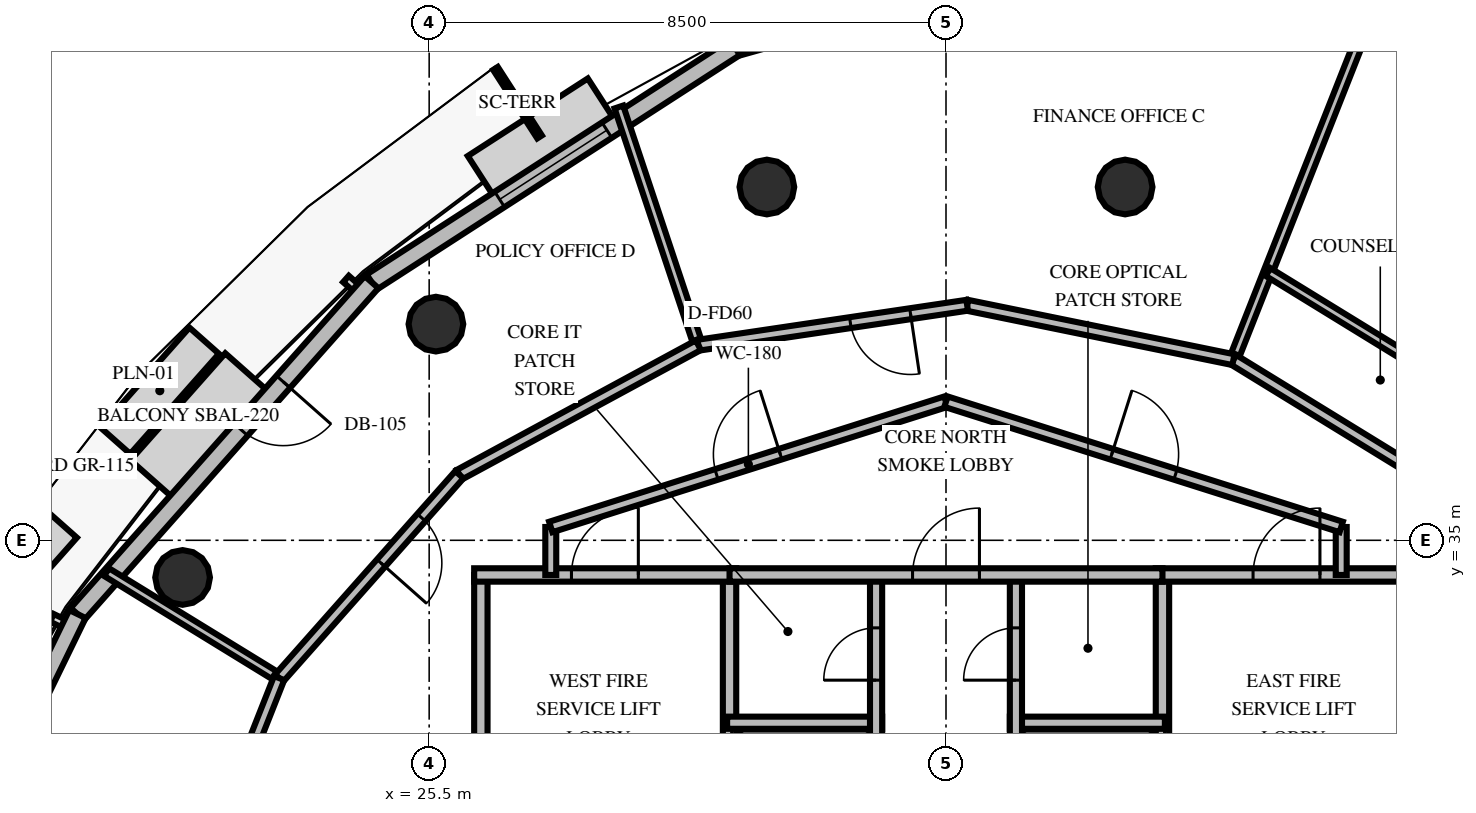
"""IFC4 building model, lengths in metres.
Left out: names, types, materials, properties, quantities, classifications, styles, units other than length and angle.
Written with IfcOpenShell. Run it as: python <this file> out.ifc"""

import sys

from ifc_helpers import new_model, si_unit, direction, frame, frame_2d, origin, origin_2d, place, context, subcontext, project, spatial, rectangle, circle, extrude, element, fill, save


model = new_model("IFC4")
c1 = context("Model", 3, precision=1e-05, world=origin(), true_north=direction((0.0, 1.0)))
c2 = subcontext(c1, "Body", "Model", "MODEL_VIEW")
j1 = project(units=[si_unit("LENGTHUNIT", "METRE"), si_unit("PLANEANGLEUNIT", "RADIAN")], contexts=[c1])
p1 = place(None, origin())
s1 = spatial("IfcSite", under=j1, at=p1, CompositionType="ELEMENT")
p2 = place(p1, origin())
s2 = spatial("IfcBuilding", under=s1, at=p2, CompositionType="ELEMENT")
p3 = place(p2, frame((0.0, 0.0, 234.0)))
s3 = spatial("IfcBuildingStorey", under=s2, at=p3, CompositionType="ELEMENT", Elevation=234.0)
for number, where, z_axis, x_axis in (
    (1, (36.946, 40.81, 0.0), (0.0, 0.0, 1.0), (1.0, 0.0, 0.0)),
    (2, (31.054, 40.81, 0.0), (0.0, 0.0, 1.0), (1.0, 0.0, 0.0)),
    (3, (25.611, 38.555, 0.0), (0.0, 0.0, 1.0), (1.0, 0.0, 0.0)),
    (4, (21.445, 34.389, 0.0), (0.0, 0.0, 1.0), (1.0, 0.0, 0.0)),
):
    element("IfcColumn", number, at=place(p3, frame(where, z_axis=z_axis, x_axis=x_axis)), inside=s3, PredefinedType="COLUMN", context=c2, shape_type="SweptSolid", body=[
        extrude(circle(Radius=0.45, at=origin_2d()), origin(), (0.0, 0.0, 1.0), 3.6),
    ])
p4 = place(p3, frame((36.925, 44.903, 0.0), z_axis=(0.0, 0.0, 1.0), x_axis=(-0.962704799022, -0.270554005589, 0.0)))
e5 = element("IfcWall", 5, at=p4, inside=s3, PredefinedType="SOLIDWALL", context=c2, shape_type="SweptSolid", body=[
    extrude(rectangle(XDim=6.643, YDim=0.3, at=frame_2d((3.322, 0.0))), origin(), (0.0, 0.0, 1.0), 2.76),
])
p5 = place(p4, frame((2.272, 0.0, 0.8)))
e6 = element("IfcOpeningElement", 6, at=p5, cuts=e5, PredefinedType="OPENING", context=c2, shape_type="SweptSolid", body=[
    extrude(rectangle(XDim=2.1, YDim=1.85, at=frame_2d((1.05, 0.925))), frame((0.0, 0.16, 0.0), z_axis=(0.0, -1.0, 0.0), x_axis=(1.0, 0.0, 0.0)), (0.0, 0.0, 1.0), 0.32),
])
p6 = place(p3, frame((30.53, 43.106, 0.0), z_axis=(0.0, 0.0, 1.0), x_axis=(-0.840018200764, -0.542558220272, 0.0)))
e7 = element("IfcWall", 7, at=p6, inside=s3, PredefinedType="SOLIDWALL", context=c2, shape_type="SweptSolid", body=[
    extrude(rectangle(XDim=7.115, YDim=0.3, at=frame_2d((3.558, 0.0))), origin(), (0.0, 0.0, 1.0), 2.76),
])
p7 = place(p6, frame((2.508, 0.0, 0.8)))
e8 = element("IfcOpeningElement", 8, at=p7, cuts=e7, PredefinedType="OPENING", context=c2, shape_type="SweptSolid", body=[
    extrude(rectangle(XDim=2.1, YDim=1.85, at=frame_2d((1.05, 0.925))), frame((0.0, 0.16, 0.0), z_axis=(0.0, -1.0, 0.0), x_axis=(1.0, 0.0, 0.0)), (0.0, 0.0, 1.0), 0.32),
])
p8 = place(p3, frame((24.553, 39.246, 0.0), z_axis=(0.0, 0.0, 1.0), x_axis=(-0.663261925143, -0.748387345333, 0.0)))
e9 = element("IfcWall", 9, at=p8, inside=s3, PredefinedType="SOLIDWALL", context=c2, shape_type="SweptSolid", body=[
    extrude(rectangle(XDim=7.293, YDim=0.3, at=frame_2d((3.647, 0.0))), origin(), (0.0, 0.0, 1.0), 2.76),
])
p9 = place(p8, frame((2.19, 0.0, 0.0)))
e10 = element("IfcOpeningElement", 10, at=p9, cuts=e9, PredefinedType="OPENING", context=c2, shape_type="SweptSolid", body=[
    extrude(rectangle(XDim=1.05, YDim=2.15, at=frame_2d((0.525, 1.075))), frame((0.0, 0.16, 0.0), z_axis=(0.0, -1.0, 0.0), x_axis=(1.0, 0.0, 0.0)), (0.0, 0.0, 1.0), 0.32),
])
p10 = place(p3, frame((19.716, 33.787, 0.0), z_axis=(0.0, 0.0, 1.0), x_axis=(-0.437731914834, -0.899105539264, 0.0)))
e11 = element("IfcWall", 11, at=p10, inside=s3, PredefinedType="SOLIDWALL", context=c2, shape_type="SweptSolid", body=[
    extrude(rectangle(XDim=7.115, YDim=0.3, at=frame_2d((3.558, 0.0))), origin(), (0.0, 0.0, 1.0), 2.76),
])
p11 = place(p10, frame((2.508, 0.0, 0.8)))
e12 = element("IfcOpeningElement", 12, at=p11, cuts=e11, PredefinedType="OPENING", context=c2, shape_type="SweptSolid", body=[
    extrude(rectangle(XDim=2.1, YDim=1.85, at=frame_2d((1.05, 0.925))), frame((0.0, 0.16, 0.0), z_axis=(0.0, -1.0, 0.0), x_axis=(1.0, 0.0, 0.0)), (0.0, 0.0, 1.0), 0.32),
])
p12 = place(p3, frame((26.35, 30.05, 0.0), z_axis=(0.0, 0.0, 1.0), x_axis=(0.0, 1.0, 0.0)))
e13 = element("IfcWall", 13, at=p12, inside=s3, PredefinedType="SOLIDWALL", context=c2, shape_type="SweptSolid", body=[
    extrude(rectangle(XDim=4.38, YDim=0.22, at=frame_2d((2.19, 0.0))), origin(), (0.0, 0.0, 1.0), 2.46),
])
p13 = place(p3, frame((30.44, 30.05, 0.0), z_axis=(0.0, 0.0, 1.0), x_axis=(0.0, 1.0, 0.0)))
e14 = element("IfcWall", 14, at=p13, inside=s3, PredefinedType="SOLIDWALL", context=c2, shape_type="SweptSolid", body=[
    extrude(rectangle(XDim=4.38, YDim=0.22, at=frame_2d((2.19, 0.0))), origin(), (0.0, 0.0, 1.0), 2.46),
])
p14 = place(p13, frame((0.8, 0.0, 0.0)))
e15 = element("IfcOpeningElement", 15, at=p14, cuts=e14, PredefinedType="OPENING", context=c2, shape_type="SweptSolid", body=[
    extrude(rectangle(XDim=1.05, YDim=2.1, at=frame_2d((0.525, 1.05))), frame((0.0, 0.12, 0.0), z_axis=(0.0, -1.0, 0.0), x_axis=(1.0, 0.0, 0.0)), (0.0, 0.0, 1.0), 0.24),
])
p15 = place(p3, frame((26.24, 34.43, 0.0), z_axis=(0.0, 0.0, 1.0), x_axis=(1.0, 0.0, 0.0)))
e16 = element("IfcWall", 16, at=p15, inside=s3, PredefinedType="SOLIDWALL", context=c2, shape_type="SweptSolid", body=[
    extrude(rectangle(XDim=4.31, YDim=0.22, at=frame_2d((2.155, 0.0))), origin(), (0.0, 0.0, 1.0), 2.46),
])
p16 = place(p15, frame((1.6, 0.0, 0.0)))
e17 = element("IfcOpeningElement", 17, at=p16, cuts=e16, PredefinedType="OPENING", context=c2, shape_type="SweptSolid", body=[
    extrude(rectangle(XDim=1.1, YDim=2.15, at=frame_2d((0.55, 1.075))), frame((0.0, 0.12, 0.0), z_axis=(0.0, -1.0, 0.0), x_axis=(1.0, 0.0, 0.0)), (0.0, 0.0, 1.0), 0.24),
])
p17 = place(p3, frame((30.4, 32.0, 0.0), z_axis=(0.0, 0.0, 1.0), x_axis=(1.0, 0.0, 0.0)))
e18 = element("IfcWall", 18, at=p17, inside=s3, PredefinedType="SOLIDWALL", context=c2, shape_type="SweptSolid", body=[
    extrude(rectangle(XDim=2.55, YDim=0.2, at=frame_2d((1.275, 0.0))), origin(), (0.0, 0.0, 1.0), 2.46),
])
p18 = place(p3, frame((32.85, 30.05, 0.0), z_axis=(0.0, 0.0, 1.0), x_axis=(0.0, 1.0, 0.0)))
e19 = element("IfcWall", 19, at=p18, inside=s3, PredefinedType="SOLIDWALL", context=c2, shape_type="SweptSolid", body=[
    extrude(rectangle(XDim=4.38, YDim=0.2, at=frame_2d((2.19, 0.0))), origin(), (0.0, 0.0, 1.0), 2.46),
])
p19 = place(p18, frame((2.65, 0.0, 0.0)))
e20 = element("IfcOpeningElement", 20, at=p19, cuts=e19, PredefinedType="OPENING", context=c2, shape_type="SweptSolid", body=[
    extrude(rectangle(XDim=0.86, YDim=2.05, at=frame_2d((0.43, 1.025))), frame((0.0, 0.11, 0.0), z_axis=(0.0, -1.0, 0.0), x_axis=(1.0, 0.0, 0.0)), (0.0, 0.0, 1.0), 0.22),
])
p20 = place(p3, frame((37.56, 30.05, 0.0), z_axis=(0.0, 0.0, 1.0), x_axis=(0.0, 1.0, 0.0)))
e21 = element("IfcWall", 21, at=p20, inside=s3, PredefinedType="SOLIDWALL", context=c2, shape_type="SweptSolid", body=[
    extrude(rectangle(XDim=4.38, YDim=0.22, at=frame_2d((2.19, 0.0))), origin(), (0.0, 0.0, 1.0), 2.46),
])
p21 = place(p20, frame((0.8, 0.0, 0.0)))
e22 = element("IfcOpeningElement", 22, at=p21, cuts=e21, PredefinedType="OPENING", context=c2, shape_type="SweptSolid", body=[
    extrude(rectangle(XDim=1.05, YDim=2.1, at=frame_2d((0.525, 1.05))), frame((0.0, 0.12, 0.0), z_axis=(0.0, -1.0, 0.0), x_axis=(1.0, 0.0, 0.0)), (0.0, 0.0, 1.0), 0.24),
])
p22 = place(p3, frame((37.45, 34.43, 0.0), z_axis=(0.0, 0.0, 1.0), x_axis=(1.0, 0.0, 0.0)))
e23 = element("IfcWall", 23, at=p22, inside=s3, PredefinedType="SOLIDWALL", context=c2, shape_type="SweptSolid", body=[
    extrude(rectangle(XDim=4.31, YDim=0.22, at=frame_2d((2.155, 0.0))), origin(), (0.0, 0.0, 1.0), 2.46),
])
p23 = place(p22, frame((1.6, 0.0, 0.0)))
e24 = element("IfcOpeningElement", 24, at=p23, cuts=e23, PredefinedType="OPENING", context=c2, shape_type="SweptSolid", body=[
    extrude(rectangle(XDim=1.1, YDim=2.15, at=frame_2d((0.55, 1.075))), frame((0.0, 0.12, 0.0), z_axis=(0.0, -1.0, 0.0), x_axis=(1.0, 0.0, 0.0)), (0.0, 0.0, 1.0), 0.24),
])
p24 = place(p3, frame((35.05, 32.0, 0.0), z_axis=(0.0, 0.0, 1.0), x_axis=(1.0, 0.0, 0.0)))
e25 = element("IfcWall", 25, at=p24, inside=s3, PredefinedType="SOLIDWALL", context=c2, shape_type="SweptSolid", body=[
    extrude(rectangle(XDim=2.55, YDim=0.2, at=frame_2d((1.275, 0.0))), origin(), (0.0, 0.0, 1.0), 2.46),
])
p25 = place(p3, frame((35.15, 30.05, 0.0), z_axis=(0.0, 0.0, 1.0), x_axis=(0.0, 1.0, 0.0)))
e26 = element("IfcWall", 26, at=p25, inside=s3, PredefinedType="SOLIDWALL", context=c2, shape_type="SweptSolid", body=[
    extrude(rectangle(XDim=4.38, YDim=0.2, at=frame_2d((2.19, 0.0))), origin(), (0.0, 0.0, 1.0), 2.46),
])
p26 = place(p25, frame((2.65, 0.0, 0.0)))
e27 = element("IfcOpeningElement", 27, at=p26, cuts=e26, PredefinedType="OPENING", context=c2, shape_type="SweptSolid", body=[
    extrude(rectangle(XDim=0.86, YDim=2.05, at=frame_2d((0.43, 1.025))), frame((0.0, 0.11, 0.0), z_axis=(0.0, -1.0, 0.0), x_axis=(1.0, 0.0, 0.0)), (0.0, 0.0, 1.0), 0.22),
])
p27 = place(p3, frame((30.44, 34.43, 0.0), z_axis=(0.0, 0.0, 1.0), x_axis=(1.0, 0.0, 0.0)))
e28 = element("IfcWall", 28, at=p27, inside=s3, PredefinedType="SOLIDWALL", context=c2, shape_type="SweptSolid", body=[
    extrude(rectangle(XDim=7.12, YDim=0.22, at=frame_2d((3.56, 0.0))), origin(), (0.0, 0.0, 1.0), 2.46),
])
p28 = place(p27, frame((3.01, 0.0, 0.0)))
e29 = element("IfcOpeningElement", 29, at=p28, cuts=e28, PredefinedType="OPENING", context=c2, shape_type="SweptSolid", body=[
    extrude(rectangle(XDim=1.1, YDim=2.15, at=frame_2d((0.55, 1.075))), frame((0.0, 0.12, 0.0), z_axis=(0.0, -1.0, 0.0), x_axis=(1.0, 0.0, 0.0)), (0.0, 0.0, 1.0), 0.24),
])
for number, where, z_axis, x_axis in (
    (30, (27.5, 34.43, 0.0), (0.0, 0.0, 1.0), (0.0, 1.0, 0.0)),
    (31, (40.5, 35.219, 0.0), (0.0, 0.0, 1.0), (0.0, -1.0, 0.0)),
):
    element("IfcWall", number, at=place(p3, frame(where, z_axis=z_axis, x_axis=x_axis)), inside=s3, PredefinedType="PARTITIONING", context=c2, shape_type="SweptSolid", body=[
        extrude(rectangle(XDim=0.789, YDim=0.18, at=frame_2d((0.395, 0.0))), origin(), (0.0, 0.0, 1.0), 2.46),
    ])
p29 = place(p3, frame((27.5, 35.219, 0.0), z_axis=(0.0, 0.0, 1.0), x_axis=(0.953228121756, 0.302251795518, 0.0)))
e32 = element("IfcWall", 32, at=p29, inside=s3, PredefinedType="PARTITIONING", context=c2, shape_type="SweptSolid", body=[
    extrude(rectangle(XDim=6.819, YDim=0.18, at=frame_2d((3.409, 0.0))), origin(), (0.0, 0.0, 1.0), 2.46),
])
p30 = place(p29, frame((2.86, 0.0, 0.0)))
e33 = element("IfcOpeningElement", 33, at=p30, cuts=e32, PredefinedType="OPENING", context=c2, shape_type="SweptSolid", body=[
    extrude(rectangle(XDim=1.1, YDim=2.15, at=frame_2d((0.55, 1.075))), frame((0.0, 0.1, 0.0), z_axis=(0.0, -1.0, 0.0), x_axis=(1.0, 0.0, 0.0)), (0.0, 0.0, 1.0), 0.2),
])
p31 = place(p3, frame((34.0, 37.28, 0.0), z_axis=(0.0, 0.0, 1.0), x_axis=(0.953228121756, -0.302251795518, 0.0)))
e34 = element("IfcWall", 34, at=p31, inside=s3, PredefinedType="PARTITIONING", context=c2, shape_type="SweptSolid", body=[
    extrude(rectangle(XDim=6.819, YDim=0.18, at=frame_2d((3.409, 0.0))), origin(), (0.0, 0.0, 1.0), 2.46),
])
p32 = place(p31, frame((2.86, 0.0, 0.0)))
e35 = element("IfcOpeningElement", 35, at=p32, cuts=e34, PredefinedType="OPENING", context=c2, shape_type="SweptSolid", body=[
    extrude(rectangle(XDim=1.1, YDim=2.15, at=frame_2d((0.55, 1.075))), frame((0.0, 0.1, 0.0), z_axis=(0.0, -1.0, 0.0), x_axis=(1.0, 0.0, 0.0)), (0.0, 0.0, 1.0), 0.2),
])
p33 = place(p3, frame((38.727, 37.97, 0.0), z_axis=(0.0, 0.0, 1.0), x_axis=(0.367303252397, 0.93010124222, 0.0)))
e36 = element("IfcWall", 36, at=p33, inside=s3, PredefinedType="PARTITIONING", context=c2, shape_type="SweptSolid", body=[
    extrude(rectangle(XDim=7.318, YDim=0.15, at=frame_2d((3.659, 0.0))), origin(), (0.0, 0.0, 1.0), 2.46),
])
p34 = place(p3, frame((42.536, 35.632, 0.0), z_axis=(0.0, 0.0, 1.0), x_axis=(-0.852175498572, 0.523256074626, 0.0)))
e37 = element("IfcWall", 37, at=p34, inside=s3, PredefinedType="PARTITIONING", context=c2, shape_type="SweptSolid", body=[
    extrude(rectangle(XDim=4.47, YDim=0.18, at=frame_2d((2.235, 0.0))), origin(), (0.0, 0.0, 1.0), 2.46),
])
p35 = place(p3, frame((43.564, 36.792, 0.0), z_axis=(0.0, 0.0, 1.0), x_axis=(-0.852170081645, 0.523264896538, 0.0)))
e38 = element("IfcWall", 38, at=p35, inside=s3, PredefinedType="PARTITIONING", context=c2, shape_type="SweptSolid", body=[
    extrude(rectangle(XDim=5.008, YDim=0.15, at=frame_2d((2.504, 0.0))), origin(), (0.0, 0.0, 1.0), 2.46),
])
p36 = place(p3, frame((29.927, 38.208, 0.0), z_axis=(0.0, 0.0, 1.0), x_axis=(-0.316458316632, 0.948606416716, 0.0)))
e39 = element("IfcWall", 39, at=p36, inside=s3, PredefinedType="PARTITIONING", context=c2, shape_type="SweptSolid", body=[
    extrude(rectangle(XDim=4.13, YDim=0.15, at=frame_2d((2.065, 0.0))), origin(), (0.0, 0.0, 1.0), 2.46),
])
p37 = place(p3, frame((38.727, 37.97, 0.0), z_axis=(0.0, 0.0, 1.0), x_axis=(-0.979757075519, 0.200190092088, 0.0)))
e40 = element("IfcWall", 40, at=p37, inside=s3, PredefinedType="PARTITIONING", context=c2, shape_type="SweptSolid", body=[
    extrude(rectangle(XDim=4.47, YDim=0.18, at=frame_2d((2.235, 0.0))), origin(), (0.0, 0.0, 1.0), 2.46),
])
p38 = place(p3, frame((34.348, 38.865, 0.0), z_axis=(0.0, 0.0, 1.0), x_axis=(-0.989146493134, -0.146932689079, 0.0)))
e41 = element("IfcWall", 41, at=p38, inside=s3, PredefinedType="PARTITIONING", context=c2, shape_type="SweptSolid", body=[
    extrude(rectangle(XDim=4.47, YDim=0.18, at=frame_2d((2.235, 0.0))), origin(), (0.0, 0.0, 1.0), 2.46),
])
p39 = place(p38, frame((0.942, 0.0, 0.0)))
e42 = element("IfcOpeningElement", 42, at=p39, cuts=e41, PredefinedType="OPENING", context=c2, shape_type="SweptSolid", body=[
    extrude(rectangle(XDim=1.0, YDim=2.15, at=frame_2d((0.5, 1.075))), frame((0.0, 0.1, 0.0), z_axis=(0.0, -1.0, 0.0), x_axis=(1.0, 0.0, 0.0)), (0.0, 0.0, 1.0), 0.2),
])
p40 = place(p3, frame((23.032, 32.734, 0.0), z_axis=(0.0, 0.0, 1.0), x_axis=(-0.852183839691, 0.523242490028, 0.0)))
e43 = element("IfcWall", 43, at=p40, inside=s3, PredefinedType="PARTITIONING", context=c2, shape_type="SweptSolid", body=[
    extrude(rectangle(XDim=3.331, YDim=0.15, at=frame_2d((1.666, 0.0))), origin(), (0.0, 0.0, 1.0), 2.46),
])
p41 = place(p3, frame((29.927, 38.208, 0.0), z_axis=(0.0, 0.0, 1.0), x_axis=(-0.879228100165, -0.476401036817, 0.0)))
e44 = element("IfcWall", 44, at=p41, inside=s3, PredefinedType="PARTITIONING", context=c2, shape_type="SweptSolid", body=[
    extrude(rectangle(XDim=4.47, YDim=0.18, at=frame_2d((2.235, 0.0))), origin(), (0.0, 0.0, 1.0), 2.46),
])
p42 = place(p3, frame((25.997, 36.079, 0.0), z_axis=(0.0, 0.0, 1.0), x_axis=(-0.663274838451, -0.748375900652, 0.0)))
e45 = element("IfcWall", 45, at=p42, inside=s3, PredefinedType="PARTITIONING", context=c2, shape_type="SweptSolid", body=[
    extrude(rectangle(XDim=4.47, YDim=0.18, at=frame_2d((2.235, 0.0))), origin(), (0.0, 0.0, 1.0), 2.46),
])
p43 = place(p42, frame((0.942, 0.0, 0.0)))
e46 = element("IfcOpeningElement", 46, at=p43, cuts=e45, PredefinedType="OPENING", context=c2, shape_type="SweptSolid", body=[
    extrude(rectangle(XDim=1.0, YDim=2.15, at=frame_2d((0.5, 1.075))), frame((0.0, 0.1, 0.0), z_axis=(0.0, -1.0, 0.0), x_axis=(1.0, 0.0, 0.0)), (0.0, 0.0, 1.0), 0.2),
])
p44 = place(p3, frame((23.032, 32.734, 0.0), z_axis=(0.0, 0.0, 1.0), x_axis=(-0.367328200365, -0.930091389712, 0.0)))
e47 = element("IfcWall", 47, at=p44, inside=s3, PredefinedType="PARTITIONING", context=c2, shape_type="SweptSolid", body=[
    extrude(rectangle(XDim=4.47, YDim=0.18, at=frame_2d((2.235, 0.0))), origin(), (0.0, 0.0, 1.0), 2.46),
])
p45 = place(p44, frame((1.735, 0.0, 0.0)))
e48 = element("IfcOpeningElement", 48, at=p45, cuts=e47, PredefinedType="OPENING", context=c2, shape_type="SweptSolid", body=[
    extrude(rectangle(XDim=1.0, YDim=2.15, at=frame_2d((0.5, 1.075))), frame((0.0, 0.1, 0.0), z_axis=(0.0, -1.0, 0.0), x_axis=(1.0, 0.0, 0.0)), (0.0, 0.0, 1.0), 0.2),
])
p46 = place(p7, origin())
e49 = element("IfcWindow", 49, at=p46, inside=s3, PartitioningType="SINGLE_PANEL", PredefinedType="WINDOW", context=c2, shape_type="SweptSolid", body=[
    extrude(rectangle(XDim=2.1, YDim=1.85, at=frame_2d((1.05, 0.925))), frame((0.0, 0.03, 0.0), z_axis=(0.0, -1.0, 0.0), x_axis=(1.0, 0.0, 0.0)), (0.0, 0.0, 1.0), 0.06),
])
fill(e8, e49)
p47 = place(p9, origin())
e50 = element("IfcDoor", 50, at=p47, inside=s3, OperationType="SINGLE_SWING_LEFT", PredefinedType="DOOR", context=c2, shape_type="SweptSolid", body=[
    extrude(rectangle(XDim=1.05, YDim=2.15, at=frame_2d((0.525, 1.075))), frame((0.0, 0.025, 0.0), z_axis=(0.0, -1.0, 0.0), x_axis=(1.0, 0.0, 0.0)), (0.0, 0.0, 1.0), 0.05),
])
fill(e10, e50)
p48 = place(p16, origin())
e51 = element("IfcDoor", 51, at=p48, inside=s3, OperationType="SINGLE_SWING_RIGHT", PredefinedType="DOOR", context=c2, shape_type="SweptSolid", body=[
    extrude(rectangle(XDim=1.1, YDim=2.15, at=frame_2d((0.55, 1.075))), frame((0.0, 0.025, 0.0), z_axis=(0.0, -1.0, 0.0), x_axis=(1.0, 0.0, 0.0)), (0.0, 0.0, 1.0), 0.05),
])
fill(e17, e51)
p49 = place(p14, origin())
e52 = element("IfcDoor", 52, at=p49, inside=s3, OperationType="DOUBLE_DOOR_SLIDING", PredefinedType="USERDEFINED", context=c2, shape_type="SweptSolid", body=[
    extrude(rectangle(XDim=1.05, YDim=2.1, at=frame_2d((0.525, 1.05))), frame((0.0, 0.025, 0.0), z_axis=(0.0, -1.0, 0.0), x_axis=(1.0, 0.0, 0.0)), (0.0, 0.0, 1.0), 0.05),
])
fill(e15, e52)
p50 = place(p19, origin())
e53 = element("IfcDoor", 53, at=p50, inside=s3, OperationType="SINGLE_SWING_LEFT", PredefinedType="TRAPDOOR", context=c2, shape_type="SweptSolid", body=[
    extrude(rectangle(XDim=0.86, YDim=2.05, at=frame_2d((0.43, 1.025))), frame((0.0, 0.025, 0.0), z_axis=(0.0, -1.0, 0.0), x_axis=(1.0, 0.0, 0.0)), (0.0, 0.0, 1.0), 0.05),
])
fill(e20, e53)
p51 = place(p23, origin())
e54 = element("IfcDoor", 54, at=p51, inside=s3, OperationType="SINGLE_SWING_RIGHT", PredefinedType="DOOR", context=c2, shape_type="SweptSolid", body=[
    extrude(rectangle(XDim=1.1, YDim=2.15, at=frame_2d((0.55, 1.075))), frame((0.0, 0.025, 0.0), z_axis=(0.0, -1.0, 0.0), x_axis=(1.0, 0.0, 0.0)), (0.0, 0.0, 1.0), 0.05),
])
fill(e24, e54)
p52 = place(p21, origin())
e55 = element("IfcDoor", 55, at=p52, inside=s3, OperationType="DOUBLE_DOOR_SLIDING", PredefinedType="USERDEFINED", context=c2, shape_type="SweptSolid", body=[
    extrude(rectangle(XDim=1.05, YDim=2.1, at=frame_2d((0.525, 1.05))), frame((0.0, 0.025, 0.0), z_axis=(0.0, -1.0, 0.0), x_axis=(1.0, 0.0, 0.0)), (0.0, 0.0, 1.0), 0.05),
])
fill(e22, e55)
p53 = place(p26, origin())
e56 = element("IfcDoor", 56, at=p53, inside=s3, OperationType="SINGLE_SWING_LEFT", PredefinedType="TRAPDOOR", context=c2, shape_type="SweptSolid", body=[
    extrude(rectangle(XDim=0.86, YDim=2.05, at=frame_2d((0.43, 1.025))), frame((0.0, 0.025, 0.0), z_axis=(0.0, -1.0, 0.0), x_axis=(1.0, 0.0, 0.0)), (0.0, 0.0, 1.0), 0.05),
])
fill(e27, e56)
p54 = place(p28, origin())
e57 = element("IfcDoor", 57, at=p54, inside=s3, OperationType="SINGLE_SWING_RIGHT", PredefinedType="DOOR", context=c2, shape_type="SweptSolid", body=[
    extrude(rectangle(XDim=1.1, YDim=2.15, at=frame_2d((0.55, 1.075))), frame((0.0, 0.025, 0.0), z_axis=(0.0, -1.0, 0.0), x_axis=(1.0, 0.0, 0.0)), (0.0, 0.0, 1.0), 0.05),
])
fill(e29, e57)
p55 = place(p30, origin())
e58 = element("IfcDoor", 58, at=p55, inside=s3, OperationType="SINGLE_SWING_RIGHT", PredefinedType="DOOR", context=c2, shape_type="SweptSolid", body=[
    extrude(rectangle(XDim=1.1, YDim=2.15, at=frame_2d((0.55, 1.075))), frame((0.0, 0.025, 0.0), z_axis=(0.0, -1.0, 0.0), x_axis=(1.0, 0.0, 0.0)), (0.0, 0.0, 1.0), 0.05),
])
fill(e33, e58)
p56 = place(p32, origin())
e59 = element("IfcDoor", 59, at=p56, inside=s3, OperationType="SINGLE_SWING_LEFT", PredefinedType="DOOR", context=c2, shape_type="SweptSolid", body=[
    extrude(rectangle(XDim=1.1, YDim=2.15, at=frame_2d((0.55, 1.075))), frame((0.0, 0.025, 0.0), z_axis=(0.0, -1.0, 0.0), x_axis=(1.0, 0.0, 0.0)), (0.0, 0.0, 1.0), 0.05),
])
fill(e35, e59)
p57 = place(p39, origin())
e60 = element("IfcDoor", 60, at=p57, inside=s3, OperationType="SINGLE_SWING_LEFT", PredefinedType="DOOR", context=c2, shape_type="SweptSolid", body=[
    extrude(rectangle(XDim=1.0, YDim=2.15, at=frame_2d((0.5, 1.075))), frame((0.0, 0.025, 0.0), z_axis=(0.0, -1.0, 0.0), x_axis=(1.0, 0.0, 0.0)), (0.0, 0.0, 1.0), 0.05),
])
fill(e42, e60)
p58 = place(p43, origin())
e61 = element("IfcDoor", 61, at=p58, inside=s3, OperationType="SINGLE_SWING_RIGHT", PredefinedType="DOOR", context=c2, shape_type="SweptSolid", body=[
    extrude(rectangle(XDim=1.0, YDim=2.15, at=frame_2d((0.5, 1.075))), frame((0.0, 0.025, 0.0), z_axis=(0.0, -1.0, 0.0), x_axis=(1.0, 0.0, 0.0)), (0.0, 0.0, 1.0), 0.05),
])
fill(e46, e61)
save(model, sys.argv[1])
